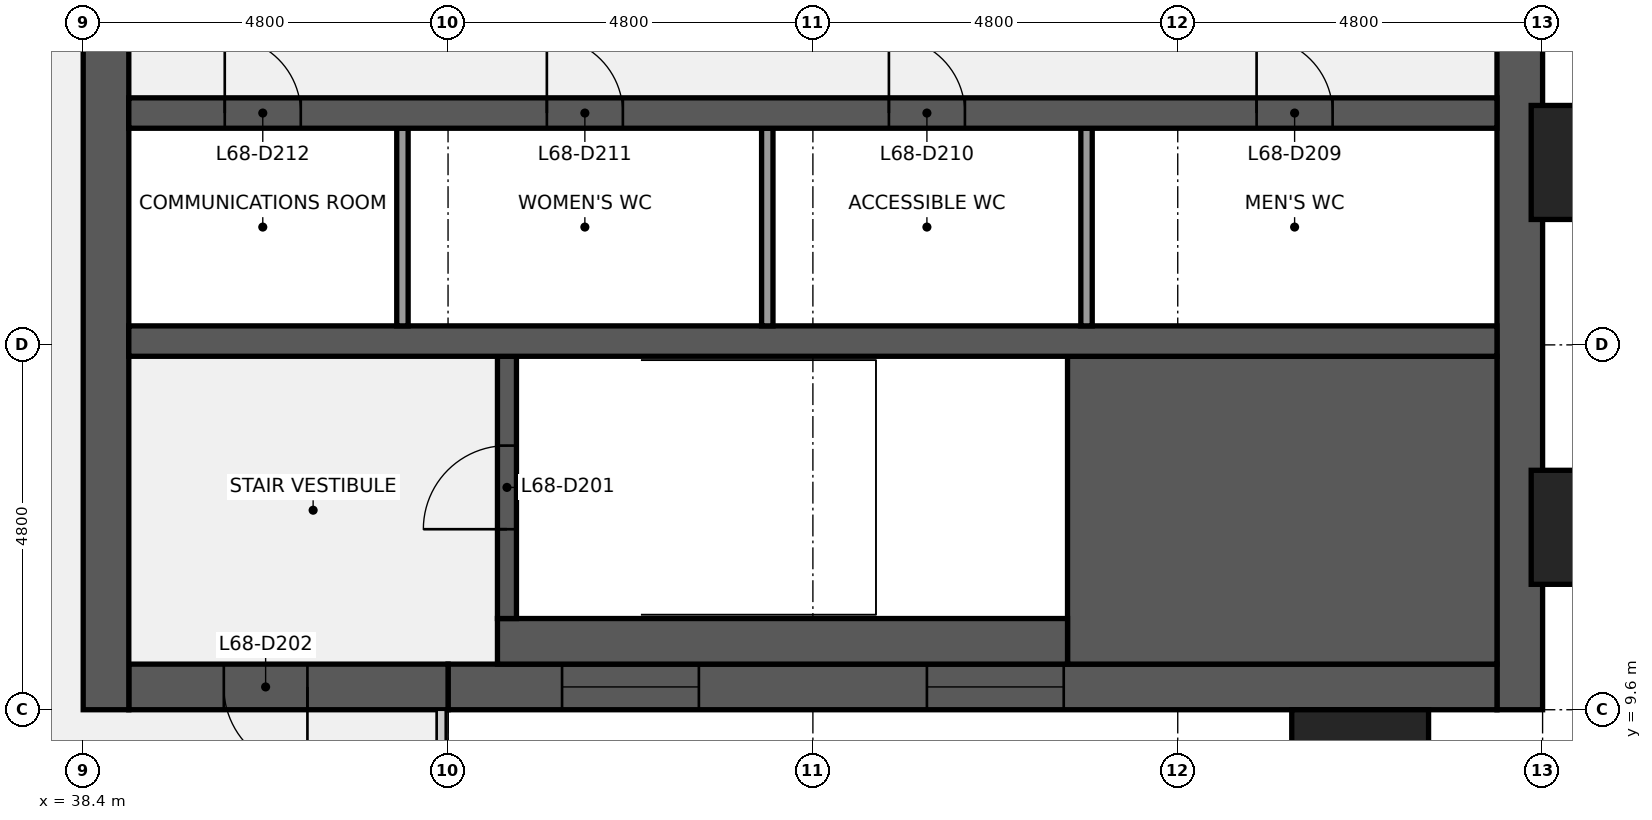
"""IFC4 building model, lengths in metres.
Left out: names, types, materials, properties, quantities, classifications, styles, units other than length and angle.
Written with IfcOpenShell. Run it as: python <this file> out.ifc"""

import sys

from ifc_helpers import new_model, si_unit, direction, frame, frame_2d, origin, origin_2d, place, context, subcontext, project, spatial, rectangle, extrude, element, fill, save


model = new_model("IFC4")
c1 = context("Model", 3, precision=1e-05, world=origin(), true_north=direction((0.0, 1.0)))
c2 = subcontext(c1, "Body", "Model", "MODEL_VIEW")
j1 = project(units=[si_unit("LENGTHUNIT", "METRE"), si_unit("PLANEANGLEUNIT", "RADIAN")], contexts=[c1])
p1 = place(None, origin())
s1 = spatial("IfcSite", under=j1, at=p1, CompositionType="ELEMENT")
p2 = place(p1, origin())
s2 = spatial("IfcBuilding", under=s1, at=p2, CompositionType="ELEMENT")
p3 = place(p2, frame((0.0, 0.0, 310.3)))
s3 = spatial("IfcBuildingStorey", under=s2, at=p3, CompositionType="ELEMENT", Elevation=310.3)
p4 = place(p3, frame((57.3, 38.4, 0.0), z_axis=(0.0, 0.0, 1.0), x_axis=(0.0, -1.0, 0.0)))
e1 = element("IfcWall", 1, at=p4, inside=s3, PredefinedType="SHEAR", context=c2, shape_type="SweptSolid", body=[
    extrude(rectangle(XDim=28.8, YDim=0.6, at=frame_2d((14.4, 0.0))), origin(), (0.0, 0.0, 1.0), 3.84),
])
p5 = place(p4, frame((18.45, 0.0, 0.9)))
e2 = element("IfcOpeningElement", 2, at=p5, cuts=e1, PredefinedType="OPENING", context=c2, shape_type="SweptSolid", body=[
    extrude(rectangle(XDim=1.5, YDim=1.5, at=frame_2d((0.75, 0.75))), frame((0.0, 0.31, 0.0), z_axis=(0.0, -1.0, 0.0), x_axis=(1.0, 0.0, 0.0)), (0.0, 0.0, 1.0), 0.62),
])
p6 = place(p4, frame((8.85, 0.0, 0.9)))
e3 = element("IfcOpeningElement", 3, at=p6, cuts=e1, PredefinedType="OPENING", context=c2, shape_type="SweptSolid", body=[
    extrude(rectangle(XDim=1.5, YDim=1.5, at=frame_2d((0.75, 0.75))), frame((0.0, 0.31, 0.0), z_axis=(0.0, -1.0, 0.0), x_axis=(1.0, 0.0, 0.0)), (0.0, 0.0, 1.0), 0.62),
])
p7 = place(p3, frame((57.0, 9.9, 0.0), z_axis=(0.0, 0.0, 1.0), x_axis=(-1.0, 0.0, 0.0)))
e4 = element("IfcWall", 4, at=p7, inside=s3, PredefinedType="SHEAR", context=c2, shape_type="SweptSolid", body=[
    extrude(rectangle(XDim=13.8, YDim=0.6, at=frame_2d((6.9, 0.0))), origin(), (0.0, 0.0, 1.0), 3.84),
])
p8 = place(p7, frame((5.7, 0.0, 0.9)))
e5 = element("IfcOpeningElement", 5, at=p8, cuts=e4, PredefinedType="OPENING", context=c2, shape_type="SweptSolid", body=[
    extrude(rectangle(XDim=1.8, YDim=1.5, at=frame_2d((0.9, 0.75))), frame((0.0, 0.31, 0.0), z_axis=(0.0, -1.0, 0.0), x_axis=(1.0, 0.0, 0.0)), (0.0, 0.0, 1.0), 0.62),
])
p9 = place(p7, frame((10.5, 0.0, 0.9)))
e6 = element("IfcOpeningElement", 6, at=p9, cuts=e4, PredefinedType="OPENING", context=c2, shape_type="SweptSolid", body=[
    extrude(rectangle(XDim=1.8, YDim=1.5, at=frame_2d((0.9, 0.75))), frame((0.0, 0.31, 0.0), z_axis=(0.0, -1.0, 0.0), x_axis=(1.0, 0.0, 0.0)), (0.0, 0.0, 1.0), 0.62),
])
p10 = place(p3, frame((43.2, 9.9, 0.0), z_axis=(0.0, 0.0, 1.0), x_axis=(-1.0, 0.0, 0.0)))
e7 = element("IfcWall", 7, at=p10, inside=s3, PredefinedType="SHEAR", context=c2, shape_type="SweptSolid", body=[
    extrude(rectangle(XDim=4.2, YDim=0.6, at=frame_2d((2.1, 0.0))), origin(), (0.0, 0.0, 1.0), 3.84),
])
p11 = place(p10, frame((1.85, 0.0, 0.0)))
e8 = element("IfcOpeningElement", 8, at=p11, cuts=e7, PredefinedType="OPENING", context=c2, shape_type="SweptSolid", body=[
    extrude(rectangle(XDim=1.1, YDim=2.1, at=frame_2d((0.55, 1.05))), frame((0.0, 0.31, 0.0), z_axis=(0.0, -1.0, 0.0), x_axis=(1.0, 0.0, 0.0)), (0.0, 0.0, 1.0), 0.62),
])
p12 = place(p3, frame((38.7, 9.6, 0.0), z_axis=(0.0, 0.0, 1.0), x_axis=(0.0, 1.0, 0.0)))
e9 = element("IfcWall", 9, at=p12, inside=s3, PredefinedType="SHEAR", context=c2, shape_type="SweptSolid", body=[
    extrude(rectangle(XDim=28.8, YDim=0.6, at=frame_2d((14.4, 0.0))), origin(), (0.0, 0.0, 1.0), 3.84),
])
p13 = place(p12, frame((8.7, 0.0, 0.0)))
e10 = element("IfcOpeningElement", 10, at=p13, cuts=e9, PredefinedType="OPENING", context=c2, shape_type="SweptSolid", body=[
    extrude(rectangle(XDim=1.8, YDim=2.1, at=frame_2d((0.9, 1.05))), frame((0.0, 0.31, 0.0), z_axis=(0.0, -1.0, 0.0), x_axis=(1.0, 0.0, 0.0)), (0.0, 0.0, 1.0), 0.62),
])
p14 = place(p12, frame((18.3, 0.0, 0.0)))
e11 = element("IfcOpeningElement", 11, at=p14, cuts=e9, PredefinedType="OPENING", context=c2, shape_type="SweptSolid", body=[
    extrude(rectangle(XDim=1.8, YDim=2.1, at=frame_2d((0.9, 1.05))), frame((0.0, 0.31, 0.0), z_axis=(0.0, -1.0, 0.0), x_axis=(1.0, 0.0, 0.0)), (0.0, 0.0, 1.0), 0.62),
])
p15 = place(p3, frame((51.35, 12.225, 0.0), z_axis=(0.0, 0.0, 1.0), x_axis=(1.0, 0.0, 0.0)))
e12 = element("IfcWall", 12, at=p15, inside=s3, PredefinedType="SHEAR", context=c2, shape_type="SweptSolid", body=[
    extrude(rectangle(XDim=5.65, YDim=4.05, at=frame_2d((2.825, 0.0))), origin(), (0.0, 0.0, 1.0), 3.84),
])
p16 = place(p3, frame((43.85, 10.5, 0.0), z_axis=(0.0, 0.0, 1.0), x_axis=(1.0, 0.0, 0.0)))
e13 = element("IfcWall", 13, at=p16, inside=s3, PredefinedType="SHEAR", context=c2, shape_type="SweptSolid", body=[
    extrude(rectangle(XDim=7.5, YDim=0.6, at=frame_2d((3.75, 0.0))), origin(), (0.0, 0.0, 1.0), 3.84),
])
p17 = place(p3, frame((43.975, 10.8, 0.0), z_axis=(0.0, 0.0, 1.0), x_axis=(0.0, 1.0, 0.0)))
e14 = element("IfcWall", 14, at=p17, inside=s3, PredefinedType="SHEAR", context=c2, shape_type="SweptSolid", body=[
    extrude(rectangle(XDim=3.45, YDim=0.25, at=frame_2d((1.725, 0.0))), origin(), (0.0, 0.0, 1.0), 3.84),
])
p18 = place(p17, frame((1.175, 0.0, 0.0)))
e15 = element("IfcOpeningElement", 15, at=p18, cuts=e14, PredefinedType="OPENING", context=c2, shape_type="SweptSolid", body=[
    extrude(rectangle(XDim=1.1, YDim=2.1, at=frame_2d((0.55, 1.05))), frame((0.0, 0.135, 0.0), z_axis=(0.0, -1.0, 0.0), x_axis=(1.0, 0.0, 0.0)), (0.0, 0.0, 1.0), 0.27),
])
p19 = place(p3, frame((39.0, 14.45, 0.0), z_axis=(0.0, 0.0, 1.0), x_axis=(1.0, 0.0, 0.0)))
e16 = element("IfcWall", 16, at=p19, inside=s3, PredefinedType="SHEAR", context=c2, shape_type="SweptSolid", body=[
    extrude(rectangle(XDim=18.0, YDim=0.4, at=frame_2d((9.0, 0.0))), origin(), (0.0, 0.0, 1.0), 3.84),
])
for number, where, z_axis, x_axis in (
    (17, (51.6, 14.65, 0.0), (0.0, 0.0, 1.0), (0.0, 1.0, 0.0)),
    (18, (47.4, 14.65, 0.0), (0.0, 0.0, 1.0), (0.0, 1.0, 0.0)),
    (19, (42.6, 14.65, 0.0), (0.0, 0.0, 1.0), (0.0, 1.0, 0.0)),
):
    element("IfcWall", number, at=place(p3, frame(where, z_axis=z_axis, x_axis=x_axis)), inside=s3, PredefinedType="PARTITIONING", context=c2, shape_type="SweptSolid", body=[
        extrude(rectangle(XDim=2.6, YDim=0.15, at=frame_2d((1.3, 0.0))), origin(), (0.0, 0.0, 1.0), 3.84),
    ])
p20 = place(p3, frame((39.0, 17.45, 0.0), z_axis=(0.0, 0.0, 1.0), x_axis=(1.0, 0.0, 0.0)))
e20 = element("IfcWall", 20, at=p20, inside=s3, PredefinedType="SHEAR", context=c2, shape_type="SweptSolid", body=[
    extrude(rectangle(XDim=18.0, YDim=0.4, at=frame_2d((9.0, 0.0))), origin(), (0.0, 0.0, 1.0), 3.84),
])
p21 = place(p20, frame((14.837, 0.0, 0.0)))
e21 = element("IfcOpeningElement", 21, at=p21, cuts=e20, PredefinedType="OPENING", context=c2, shape_type="SweptSolid", body=[
    extrude(rectangle(XDim=1.0, YDim=2.1, at=frame_2d((0.5, 1.05))), frame((0.0, 0.21, 0.0), z_axis=(0.0, -1.0, 0.0), x_axis=(1.0, 0.0, 0.0)), (0.0, 0.0, 1.0), 0.42),
])
p22 = place(p20, frame((10.0, 0.0, 0.0)))
e22 = element("IfcOpeningElement", 22, at=p22, cuts=e20, PredefinedType="OPENING", context=c2, shape_type="SweptSolid", body=[
    extrude(rectangle(XDim=1.0, YDim=2.1, at=frame_2d((0.5, 1.05))), frame((0.0, 0.21, 0.0), z_axis=(0.0, -1.0, 0.0), x_axis=(1.0, 0.0, 0.0)), (0.0, 0.0, 1.0), 0.42),
])
p23 = place(p20, frame((5.5, 0.0, 0.0)))
e23 = element("IfcOpeningElement", 23, at=p23, cuts=e20, PredefinedType="OPENING", context=c2, shape_type="SweptSolid", body=[
    extrude(rectangle(XDim=1.0, YDim=2.1, at=frame_2d((0.5, 1.05))), frame((0.0, 0.21, 0.0), z_axis=(0.0, -1.0, 0.0), x_axis=(1.0, 0.0, 0.0)), (0.0, 0.0, 1.0), 0.42),
])
p24 = place(p20, frame((1.262, 0.0, 0.0)))
e24 = element("IfcOpeningElement", 24, at=p24, cuts=e20, PredefinedType="OPENING", context=c2, shape_type="SweptSolid", body=[
    extrude(rectangle(XDim=1.0, YDim=2.1, at=frame_2d((0.5, 1.05))), frame((0.0, 0.21, 0.0), z_axis=(0.0, -1.0, 0.0), x_axis=(1.0, 0.0, 0.0)), (0.0, 0.0, 1.0), 0.42),
])
for number, where, z_axis, x_axis in (
    (25, (55.2, 8.85, 0.0), (0.0, 0.0, 1.0), (1.0, 0.0, 0.0)),
    (26, (58.35, 12.0, 0.0), (0.0, 0.0, 1.0), (0.0, 1.0, 0.0)),
    (27, (58.35, 16.8, 0.0), (0.0, 0.0, 1.0), (0.0, 1.0, 0.0)),
):
    element("IfcColumn", number, at=place(p3, frame(where, z_axis=z_axis, x_axis=x_axis)), inside=s3, PredefinedType="PILASTER", context=c2, shape_type="SweptSolid", body=[
        extrude(rectangle(XDim=1.8, YDim=1.5, at=origin_2d()), origin(), (0.0, 0.0, 1.0), 4.0),
    ])
p25 = place(p18, origin())
e28 = element("IfcDoor", 28, at=p25, inside=s3, OperationType="SINGLE_SWING_LEFT", PredefinedType="DOOR", context=c2, shape_type="SweptSolid", body=[
    extrude(rectangle(XDim=1.1, YDim=2.1, at=frame_2d((0.55, 1.05))), frame((0.0, 0.025, 0.0), z_axis=(0.0, -1.0, 0.0), x_axis=(1.0, 0.0, 0.0)), (0.0, 0.0, 1.0), 0.05),
])
fill(e15, e28)
p26 = place(p11, origin())
e29 = element("IfcDoor", 29, at=p26, inside=s3, OperationType="SINGLE_SWING_LEFT", PredefinedType="DOOR", context=c2, shape_type="SweptSolid", body=[
    extrude(rectangle(XDim=1.1, YDim=2.1, at=frame_2d((0.55, 1.05))), frame((0.0, 0.025, 0.0), z_axis=(0.0, -1.0, 0.0), x_axis=(1.0, 0.0, 0.0)), (0.0, 0.0, 1.0), 0.05),
])
fill(e8, e29)
p27 = place(p21, origin())
e30 = element("IfcDoor", 30, at=p27, inside=s3, OperationType="SINGLE_SWING_LEFT", PredefinedType="DOOR", context=c2, shape_type="SweptSolid", body=[
    extrude(rectangle(XDim=1.0, YDim=2.1, at=frame_2d((0.5, 1.05))), frame((0.0, 0.025, 0.0), z_axis=(0.0, -1.0, 0.0), x_axis=(1.0, 0.0, 0.0)), (0.0, 0.0, 1.0), 0.05),
])
fill(e21, e30)
p28 = place(p22, origin())
e31 = element("IfcDoor", 31, at=p28, inside=s3, OperationType="SINGLE_SWING_LEFT", PredefinedType="DOOR", context=c2, shape_type="SweptSolid", body=[
    extrude(rectangle(XDim=1.0, YDim=2.1, at=frame_2d((0.5, 1.05))), frame((0.0, 0.025, 0.0), z_axis=(0.0, -1.0, 0.0), x_axis=(1.0, 0.0, 0.0)), (0.0, 0.0, 1.0), 0.05),
])
fill(e22, e31)
p29 = place(p23, origin())
e32 = element("IfcDoor", 32, at=p29, inside=s3, OperationType="SINGLE_SWING_LEFT", PredefinedType="DOOR", context=c2, shape_type="SweptSolid", body=[
    extrude(rectangle(XDim=1.0, YDim=2.1, at=frame_2d((0.5, 1.05))), frame((0.0, 0.025, 0.0), z_axis=(0.0, -1.0, 0.0), x_axis=(1.0, 0.0, 0.0)), (0.0, 0.0, 1.0), 0.05),
])
fill(e23, e32)
p30 = place(p24, origin())
e33 = element("IfcDoor", 33, at=p30, inside=s3, OperationType="SINGLE_SWING_LEFT", PredefinedType="DOOR", context=c2, shape_type="SweptSolid", body=[
    extrude(rectangle(XDim=1.0, YDim=2.1, at=frame_2d((0.5, 1.05))), frame((0.0, 0.025, 0.0), z_axis=(0.0, -1.0, 0.0), x_axis=(1.0, 0.0, 0.0)), (0.0, 0.0, 1.0), 0.05),
])
fill(e24, e33)
p31 = place(p8, origin())
e34 = element("IfcWindow", 34, at=p31, inside=s3, PartitioningType="SINGLE_PANEL", PredefinedType="WINDOW", context=c2, shape_type="SweptSolid", body=[
    extrude(rectangle(XDim=1.8, YDim=1.5, at=frame_2d((0.9, 0.75))), frame((0.0, 0.03, 0.0), z_axis=(0.0, -1.0, 0.0), x_axis=(1.0, 0.0, 0.0)), (0.0, 0.0, 1.0), 0.06),
])
fill(e5, e34)
p32 = place(p9, origin())
e35 = element("IfcWindow", 35, at=p32, inside=s3, PartitioningType="SINGLE_PANEL", PredefinedType="WINDOW", context=c2, shape_type="SweptSolid", body=[
    extrude(rectangle(XDim=1.8, YDim=1.5, at=frame_2d((0.9, 0.75))), frame((0.0, 0.03, 0.0), z_axis=(0.0, -1.0, 0.0), x_axis=(1.0, 0.0, 0.0)), (0.0, 0.0, 1.0), 0.06),
])
fill(e6, e35)
save(model, sys.argv[1])
